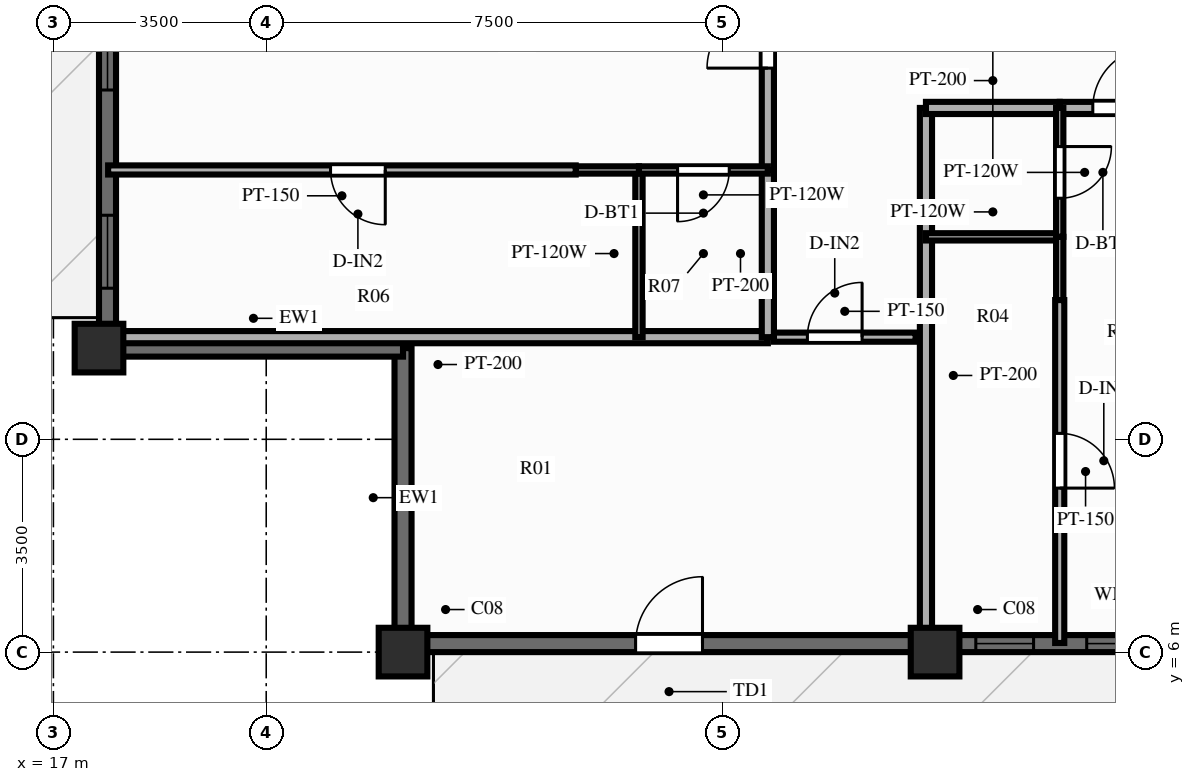
"""IFC4 building model, lengths in metres.
Left out: names, types, materials, properties, quantities, classifications, styles, units other than length and angle.
Written with IfcOpenShell. Run it as: python <this file> out.ifc"""

import sys

from ifc_helpers import new_model, si_unit, direction, frame, frame_2d, origin, origin_2d, place, context, subcontext, project, spatial, rectangle, extrude, source, transform, mapped, element, fill, save


model = new_model("IFC4")
c1 = context("Model", 3, precision=1e-05, world=origin(), true_north=direction((0.0, 1.0)))
c2 = subcontext(c1, "Body", "Model", "MODEL_VIEW")
j1 = project(units=[si_unit("LENGTHUNIT", "METRE"), si_unit("PLANEANGLEUNIT", "RADIAN")], contexts=[c1])
p1 = place(None, origin())
s1 = spatial("IfcSite", under=j1, at=p1, CompositionType="ELEMENT")
p2 = place(p1, origin())
s2 = spatial("IfcBuilding", under=s1, at=p2, CompositionType="ELEMENT")
p3 = place(p2, frame((0.0, 0.0, 179.8)))
s3 = spatial("IfcBuildingStorey", under=s2, at=p3, CompositionType="ELEMENT", Elevation=179.8)
m1 = source(origin(), c2, "Body", "SweptSolid", [
    extrude(rectangle(XDim=0.8, YDim=0.8, at=origin_2d()), origin(), (0.0, 0.0, 1.0), 3.0),
])
for number, where, z_axis, x_axis in (
    (1, (22.75, 6.0, 0.0), (0.0, 0.0, 1.0), (1.0, 0.0, 0.0)),
    (2, (31.5, 6.0, 0.0), (0.0, 0.0, 1.0), (1.0, 0.0, 0.0)),
    (3, (17.75, 11.0, 0.0), (0.0, 0.0, 1.0), (1.0, 0.0, 0.0)),
):
    element("IfcColumn", number, at=place(p3, frame(where, z_axis=z_axis, x_axis=x_axis)), inside=s3, PredefinedType="COLUMN", context=c2, shape_type="MappedRepresentation", body=[
        mapped(m1, transform((0.0, 0.0, 0.0), scale=1.0)),
    ])
p4 = place(p3, frame((22.75, 6.14, 0.0), z_axis=(0.0, 0.0, 1.0), x_axis=(1.0, 0.0, 0.0)))
e4 = element("IfcWall", 4, at=p4, inside=s3, PredefinedType="SOLIDWALL", context=c2, shape_type="SweptSolid", body=[
    extrude(rectangle(XDim=30.5, YDim=0.28, at=frame_2d((15.25, 0.0))), origin(), (0.0, 0.0, 1.0), 2.28),
])
p5 = place(p4, frame((4.925, 0.0, 0.0), z_axis=(0.0, 0.0, 1.0), x_axis=(-1.0, 0.0, 0.0)))
e5 = element("IfcOpeningElement", 5, at=p5, cuts=e4, PredefinedType="OPENING", context=c2, shape_type="SweptSolid", body=[
    extrude(rectangle(XDim=1.1, YDim=2.15, at=frame_2d((0.55, 1.075))), frame((0.0, 0.152, 0.0), z_axis=(0.0, -1.0, 0.0), x_axis=(1.0, 0.0, 0.0)), (0.0, 0.0, 1.0), 0.304),
])
p6 = place(p4, frame((9.42, 0.0, 0.25)))
e6 = element("IfcOpeningElement", 6, at=p6, cuts=e4, PredefinedType="OPENING", context=c2, shape_type="SweptSolid", body=[
    extrude(rectangle(XDim=0.95, YDim=1.5, at=frame_2d((0.475, 0.75))), frame((0.0, 0.152, 0.0), z_axis=(0.0, -1.0, 0.0), x_axis=(1.0, 0.0, 0.0)), (0.0, 0.0, 1.0), 0.304),
])
p7 = place(p4, frame((11.244, 0.0, 0.25)))
e7 = element("IfcOpeningElement", 7, at=p7, cuts=e4, PredefinedType="OPENING", context=c2, shape_type="SweptSolid", body=[
    extrude(rectangle(XDim=1.2, YDim=1.5, at=frame_2d((0.6, 0.75))), frame((0.0, 0.152, 0.0), z_axis=(0.0, -1.0, 0.0), x_axis=(1.0, 0.0, 0.0)), (0.0, 0.0, 1.0), 0.304),
])
p8 = place(p4, frame((13.602, 0.0, 0.25)))
e8 = element("IfcOpeningElement", 8, at=p8, cuts=e4, PredefinedType="OPENING", context=c2, shape_type="SweptSolid", body=[
    extrude(rectangle(XDim=1.2, YDim=1.5, at=frame_2d((0.6, 0.75))), frame((0.0, 0.152, 0.0), z_axis=(0.0, -1.0, 0.0), x_axis=(1.0, 0.0, 0.0)), (0.0, 0.0, 1.0), 0.304),
])
p9 = place(p4, frame((16.683, 0.0, 0.25)))
e9 = element("IfcOpeningElement", 9, at=p9, cuts=e4, PredefinedType="OPENING", context=c2, shape_type="SweptSolid", body=[
    extrude(rectangle(XDim=1.2, YDim=1.5, at=frame_2d((0.6, 0.75))), frame((0.0, 0.152, 0.0), z_axis=(0.0, -1.0, 0.0), x_axis=(1.0, 0.0, 0.0)), (0.0, 0.0, 1.0), 0.304),
])
p10 = place(p4, frame((19.68, 0.0, 0.25)))
e10 = element("IfcOpeningElement", 10, at=p10, cuts=e4, PredefinedType="OPENING", context=c2, shape_type="SweptSolid", body=[
    extrude(rectangle(XDim=1.2, YDim=1.5, at=frame_2d((0.6, 0.75))), frame((0.0, 0.152, 0.0), z_axis=(0.0, -1.0, 0.0), x_axis=(1.0, 0.0, 0.0)), (0.0, 0.0, 1.0), 0.304),
])
p11 = place(p4, frame((25.525, 0.0, 0.25)))
e11 = element("IfcOpeningElement", 11, at=p11, cuts=e4, PredefinedType="OPENING", context=c2, shape_type="SweptSolid", body=[
    extrude(rectangle(XDim=1.2, YDim=1.5, at=frame_2d((0.6, 0.75))), frame((0.0, 0.152, 0.0), z_axis=(0.0, -1.0, 0.0), x_axis=(1.0, 0.0, 0.0)), (0.0, 0.0, 1.0), 0.304),
])
p12 = place(p3, frame((17.89, 11.0, 0.0), z_axis=(0.0, 0.0, 1.0), x_axis=(0.0, 1.0, 0.0)))
e12 = element("IfcWall", 12, at=p12, inside=s3, PredefinedType="SOLIDWALL", context=c2, shape_type="SweptSolid", body=[
    extrude(rectangle(XDim=32.0, YDim=0.28, at=frame_2d((16.0, 0.0))), origin(), (0.0, 0.0, 1.0), 2.28),
])
p13 = place(p12, frame((0.985, 0.0, 0.25)))
e13 = element("IfcOpeningElement", 13, at=p13, cuts=e12, PredefinedType="OPENING", context=c2, shape_type="SweptSolid", body=[
    extrude(rectangle(XDim=1.2, YDim=1.5, at=frame_2d((0.6, 0.75))), frame((0.0, 0.152, 0.0), z_axis=(0.0, -1.0, 0.0), x_axis=(1.0, 0.0, 0.0)), (0.0, 0.0, 1.0), 0.304),
])
p14 = place(p12, frame((4.245, 0.0, 0.25)))
e14 = element("IfcOpeningElement", 14, at=p14, cuts=e12, PredefinedType="OPENING", context=c2, shape_type="SweptSolid", body=[
    extrude(rectangle(XDim=1.2, YDim=1.5, at=frame_2d((0.6, 0.75))), frame((0.0, 0.152, 0.0), z_axis=(0.0, -1.0, 0.0), x_axis=(1.0, 0.0, 0.0)), (0.0, 0.0, 1.0), 0.304),
])
p15 = place(p12, frame((8.667, 0.0, 0.25)))
e15 = element("IfcOpeningElement", 15, at=p15, cuts=e12, PredefinedType="OPENING", context=c2, shape_type="SweptSolid", body=[
    extrude(rectangle(XDim=1.2, YDim=1.5, at=frame_2d((0.6, 0.75))), frame((0.0, 0.152, 0.0), z_axis=(0.0, -1.0, 0.0), x_axis=(1.0, 0.0, 0.0)), (0.0, 0.0, 1.0), 0.304),
])
p16 = place(p12, frame((12.029, 0.0, 0.25)))
e16 = element("IfcOpeningElement", 16, at=p16, cuts=e12, PredefinedType="OPENING", context=c2, shape_type="SweptSolid", body=[
    extrude(rectangle(XDim=1.2, YDim=1.5, at=frame_2d((0.6, 0.75))), frame((0.0, 0.152, 0.0), z_axis=(0.0, -1.0, 0.0), x_axis=(1.0, 0.0, 0.0)), (0.0, 0.0, 1.0), 0.304),
])
p17 = place(p12, frame((15.066, 0.0, 0.0)))
e17 = element("IfcOpeningElement", 17, at=p17, cuts=e12, PredefinedType="OPENING", context=c2, shape_type="SweptSolid", body=[
    extrude(rectangle(XDim=1.6, YDim=2.15, at=frame_2d((0.8, 1.075))), frame((0.0, 0.152, 0.0), z_axis=(0.0, -1.0, 0.0), x_axis=(1.0, 0.0, 0.0)), (0.0, 0.0, 1.0), 0.304),
])
p18 = place(p12, frame((19.111, 0.0, 0.25)))
e18 = element("IfcOpeningElement", 18, at=p18, cuts=e12, PredefinedType="OPENING", context=c2, shape_type="SweptSolid", body=[
    extrude(rectangle(XDim=1.2, YDim=1.5, at=frame_2d((0.6, 0.75))), frame((0.0, 0.152, 0.0), z_axis=(0.0, -1.0, 0.0), x_axis=(1.0, 0.0, 0.0)), (0.0, 0.0, 1.0), 0.304),
])
p19 = place(p12, frame((22.47, 0.0, 0.25)))
e19 = element("IfcOpeningElement", 19, at=p19, cuts=e12, PredefinedType="OPENING", context=c2, shape_type="SweptSolid", body=[
    extrude(rectangle(XDim=1.2, YDim=1.5, at=frame_2d((0.6, 0.75))), frame((0.0, 0.152, 0.0), z_axis=(0.0, -1.0, 0.0), x_axis=(1.0, 0.0, 0.0)), (0.0, 0.0, 1.0), 0.304),
])
p20 = place(p12, frame((26.006, 0.0, 0.25)))
e20 = element("IfcOpeningElement", 20, at=p20, cuts=e12, PredefinedType="OPENING", context=c2, shape_type="SweptSolid", body=[
    extrude(rectangle(XDim=1.2, YDim=1.5, at=frame_2d((0.6, 0.75))), frame((0.0, 0.152, 0.0), z_axis=(0.0, -1.0, 0.0), x_axis=(1.0, 0.0, 0.0)), (0.0, 0.0, 1.0), 0.304),
])
p21 = place(p12, frame((29.266, 0.0, 0.25)))
e21 = element("IfcOpeningElement", 21, at=p21, cuts=e12, PredefinedType="OPENING", context=c2, shape_type="SweptSolid", body=[
    extrude(rectangle(XDim=1.2, YDim=1.5, at=frame_2d((0.6, 0.75))), frame((0.0, 0.152, 0.0), z_axis=(0.0, -1.0, 0.0), x_axis=(1.0, 0.0, 0.0)), (0.0, 0.0, 1.0), 0.304),
])
for number, where, z_axis, x_axis in (
    (22, (22.75, 6.08, 0.0), (0.0, 0.0, 1.0), (0.0, 1.0, 0.0)),
    (23, (17.83, 11.0, 0.0), (0.0, 0.0, 1.0), (1.0, 0.0, 0.0)),
):
    element("IfcWall", number, at=place(p3, frame(where, z_axis=z_axis, x_axis=x_axis)), inside=s3, PredefinedType="SOLIDWALL", context=c2, shape_type="SweptSolid", body=[
        extrude(rectangle(XDim=4.92, YDim=0.28, at=frame_2d((2.46, 0.0))), origin(), (0.0, 0.0, 1.0), 2.28),
    ])
p22 = place(p3, frame((28.85, 11.18, 0.0), z_axis=(0.0, 0.0, 1.0), x_axis=(1.0, 0.0, 0.0)))
e24 = element("IfcWall", 24, at=p22, inside=s3, PredefinedType="PARTITIONING", context=c2, shape_type="SweptSolid", body=[
    extrude(rectangle(XDim=2.33, YDim=0.15, at=frame_2d((1.165, 0.0))), origin(), (0.0, 0.0, 1.0), 2.79),
])
p23 = place(p22, frame((0.55, 0.0, 0.0)))
e25 = element("IfcOpeningElement", 25, at=p23, cuts=e24, PredefinedType="OPENING", context=c2, shape_type="SweptSolid", body=[
    extrude(rectangle(XDim=0.9, YDim=2.1, at=frame_2d((0.45, 1.05))), frame((0.0, 0.087, 0.0), z_axis=(0.0, -1.0, 0.0), x_axis=(1.0, 0.0, 0.0)), (0.0, 0.0, 1.0), 0.174),
])
p24 = place(p3, frame((31.35, 14.95, 0.0), z_axis=(0.0, 0.0, 1.0), x_axis=(0.0, -1.0, 0.0)))
e26 = element("IfcWall", 26, at=p24, inside=s3, PredefinedType="PARTITIONING", context=c2, shape_type="SweptSolid", body=[
    extrude(rectangle(XDim=8.8, YDim=0.2, at=frame_2d((4.4, 0.0))), origin(), (0.0, 0.0, 1.0), 2.39),
])
p25 = place(p3, frame((31.35, 14.95, 0.0), z_axis=(0.0, 0.0, 1.0), x_axis=(1.0, 0.0, 0.0)))
e27 = element("IfcWall", 27, at=p25, inside=s3, PredefinedType="PARTITIONING", context=c2, shape_type="SweptSolid", body=[
    extrude(rectangle(XDim=2.2, YDim=0.2, at=frame_2d((1.1, 0.0))), origin(), (0.0, 0.0, 1.0), 2.79),
])
p26 = place(p3, frame((33.55, 14.95, 0.0), z_axis=(0.0, 0.0, 1.0), x_axis=(1.0, 0.0, 0.0)))
e28 = element("IfcWall", 28, at=p26, inside=s3, PredefinedType="PARTITIONING", context=c2, shape_type="SweptSolid", body=[
    extrude(rectangle(XDim=2.088, YDim=0.2, at=frame_2d((1.044, 0.0))), origin(), (0.0, 0.0, 1.0), 2.79),
])
p27 = place(p26, frame((0.544, 0.0, 0.0)))
e29 = element("IfcOpeningElement", 29, at=p27, cuts=e28, PredefinedType="OPENING", context=c2, shape_type="SweptSolid", body=[
    extrude(rectangle(XDim=1.0, YDim=2.15, at=frame_2d((0.5, 1.075))), frame((0.0, 0.112, 0.0), z_axis=(0.0, -1.0, 0.0), x_axis=(1.0, 0.0, 0.0)), (0.0, 0.0, 1.0), 0.224),
])
p28 = place(p3, frame((31.35, 12.83, 0.0), z_axis=(0.0, 0.0, 1.0), x_axis=(1.0, 0.0, 0.0)))
e30 = element("IfcWall", 30, at=p28, inside=s3, PredefinedType="PARTITIONING", context=c2, shape_type="SweptSolid", body=[
    extrude(rectangle(XDim=2.2, YDim=0.12, at=frame_2d((1.1, 0.0))), origin(), (0.0, 0.0, 1.0), 2.79),
])
p29 = place(p3, frame((33.55, 14.95, 0.0), z_axis=(0.0, 0.0, 1.0), x_axis=(0.0, -1.0, 0.0)))
e31 = element("IfcWall", 31, at=p29, inside=s3, PredefinedType="PARTITIONING", context=c2, shape_type="SweptSolid", body=[
    extrude(rectangle(XDim=2.12, YDim=0.12, at=frame_2d((1.06, 0.0))), origin(), (0.0, 0.0, 1.0), 2.79),
])
p30 = place(p29, frame((0.635, 0.0, 0.0)))
e32 = element("IfcOpeningElement", 32, at=p30, cuts=e31, PredefinedType="OPENING", context=c2, shape_type="SweptSolid", body=[
    extrude(rectangle(XDim=0.85, YDim=2.05, at=frame_2d((0.425, 1.025))), frame((0.0, 0.072, 0.0), z_axis=(0.0, -1.0, 0.0), x_axis=(1.0, 0.0, 0.0)), (0.0, 0.0, 1.0), 0.144),
])
p31 = place(p3, frame((33.55, 12.83, 0.0), z_axis=(0.0, 0.0, 1.0), x_axis=(0.0, -1.0, 0.0)))
e33 = element("IfcWall", 33, at=p31, inside=s3, PredefinedType="PARTITIONING", context=c2, shape_type="SweptSolid", body=[
    extrude(rectangle(XDim=1.04, YDim=0.12, at=frame_2d((0.52, 0.0))), origin(), (0.0, 0.0, 1.0), 2.79),
])
p32 = place(p3, frame((33.55, 11.79, 0.0), z_axis=(0.0, 0.0, 1.0), x_axis=(0.0, -1.0, 0.0)))
e34 = element("IfcWall", 34, at=p32, inside=s3, PredefinedType="PARTITIONING", context=c2, shape_type="SweptSolid", body=[
    extrude(rectangle(XDim=5.64, YDim=0.15, at=frame_2d((2.82, 0.0))), origin(), (0.0, 0.0, 1.0), 2.79),
])
p33 = place(p32, frame((2.192, 0.0, 0.0)))
e35 = element("IfcOpeningElement", 35, at=p33, cuts=e34, PredefinedType="OPENING", context=c2, shape_type="SweptSolid", body=[
    extrude(rectangle(XDim=0.9, YDim=2.1, at=frame_2d((0.45, 1.05))), frame((0.0, 0.087, 0.0), z_axis=(0.0, -1.0, 0.0), x_axis=(1.0, 0.0, 0.0)), (0.0, 0.0, 1.0), 0.174),
])
p34 = place(p3, frame((28.75, 11.18, 0.0), z_axis=(0.0, 0.0, 1.0), x_axis=(-1.0, 0.0, 0.0)))
e36 = element("IfcWall", 36, at=p34, inside=s3, PredefinedType="PARTITIONING", context=c2, shape_type="SweptSolid", body=[
    extrude(rectangle(XDim=10.85, YDim=0.2, at=frame_2d((5.425, 0.0))), origin(), (0.0, 0.0, 1.0), 2.79),
])
p35 = place(p3, frame((28.75, 11.18, 0.0), z_axis=(0.0, 0.0, 1.0), x_axis=(0.0, 1.0, 0.0)))
e37 = element("IfcWall", 37, at=p35, inside=s3, PredefinedType="PARTITIONING", context=c2, shape_type="SweptSolid", body=[
    extrude(rectangle(XDim=2.75, YDim=0.2, at=frame_2d((1.375, 0.0))), origin(), (0.0, 0.0, 1.0), 2.79),
])
p36 = place(p3, frame((28.75, 13.93, 0.0), z_axis=(0.0, 0.0, 1.0), x_axis=(0.0, 1.0, 0.0)))
e38 = element("IfcWall", 38, at=p36, inside=s3, PredefinedType="PARTITIONING", context=c2, shape_type="SweptSolid", body=[
    extrude(rectangle(XDim=4.35, YDim=0.2, at=frame_2d((2.175, 0.0))), origin(), (0.0, 0.0, 1.0), 2.79),
])
p37 = place(p36, frame((1.675, 0.0, 0.0)))
e39 = element("IfcOpeningElement", 39, at=p37, cuts=e38, PredefinedType="OPENING", context=c2, shape_type="SweptSolid", body=[
    extrude(rectangle(XDim=1.0, YDim=2.15, at=frame_2d((0.5, 1.075))), frame((0.0, 0.112, 0.0), z_axis=(0.0, -1.0, 0.0), x_axis=(1.0, 0.0, 0.0)), (0.0, 0.0, 1.0), 0.224),
])
p38 = place(p3, frame((26.63, 11.18, 0.0), z_axis=(0.0, 0.0, 1.0), x_axis=(0.0, 1.0, 0.0)))
e40 = element("IfcWall", 40, at=p38, inside=s3, PredefinedType="PARTITIONING", context=c2, shape_type="SweptSolid", body=[
    extrude(rectangle(XDim=2.75, YDim=0.12, at=frame_2d((1.375, 0.0))), origin(), (0.0, 0.0, 1.0), 2.79),
])
p39 = place(p3, frame((28.75, 13.93, 0.0), z_axis=(0.0, 0.0, 1.0), x_axis=(-1.0, 0.0, 0.0)))
e41 = element("IfcWall", 41, at=p39, inside=s3, PredefinedType="PARTITIONING", context=c2, shape_type="SweptSolid", body=[
    extrude(rectangle(XDim=2.12, YDim=0.12, at=frame_2d((1.06, 0.0))), origin(), (0.0, 0.0, 1.0), 2.79),
])
p40 = place(p39, frame((0.635, 0.0, 0.0)))
e42 = element("IfcOpeningElement", 42, at=p40, cuts=e41, PredefinedType="OPENING", context=c2, shape_type="SweptSolid", body=[
    extrude(rectangle(XDim=0.85, YDim=2.05, at=frame_2d((0.425, 1.025))), frame((0.0, 0.072, 0.0), z_axis=(0.0, -1.0, 0.0), x_axis=(1.0, 0.0, 0.0)), (0.0, 0.0, 1.0), 0.144),
])
p41 = place(p3, frame((26.63, 13.93, 0.0), z_axis=(0.0, 0.0, 1.0), x_axis=(-1.0, 0.0, 0.0)))
e43 = element("IfcWall", 43, at=p41, inside=s3, PredefinedType="PARTITIONING", context=c2, shape_type="SweptSolid", body=[
    extrude(rectangle(XDim=1.04, YDim=0.12, at=frame_2d((0.52, 0.0))), origin(), (0.0, 0.0, 1.0), 2.79),
])
p42 = place(p3, frame((25.59, 13.93, 0.0), z_axis=(0.0, 0.0, 1.0), x_axis=(-1.0, 0.0, 0.0)))
e44 = element("IfcWall", 44, at=p42, inside=s3, PredefinedType="PARTITIONING", context=c2, shape_type="SweptSolid", body=[
    extrude(rectangle(XDim=7.69, YDim=0.15, at=frame_2d((3.845, 0.0))), origin(), (0.0, 0.0, 1.0), 2.79),
])
p43 = place(p42, frame((3.132, 0.0, 0.0)))
e45 = element("IfcOpeningElement", 45, at=p43, cuts=e44, PredefinedType="OPENING", context=c2, shape_type="SweptSolid", body=[
    extrude(rectangle(XDim=0.9, YDim=2.1, at=frame_2d((0.45, 1.05))), frame((0.0, 0.087, 0.0), z_axis=(0.0, -1.0, 0.0), x_axis=(1.0, 0.0, 0.0)), (0.0, 0.0, 1.0), 0.174),
])
m2 = source(origin(), c2, "Body", "SweptSolid", [
    extrude(rectangle(XDim=1.1, YDim=2.15, at=frame_2d((0.55, 1.075))), frame((0.0, 0.025, 0.0), z_axis=(0.0, -1.0, 0.0), x_axis=(1.0, 0.0, 0.0)), (0.0, 0.0, 1.0), 0.05),
])
p44 = place(p5, origin())
e46 = element("IfcDoor", 46, at=p44, inside=s3, OperationType="SINGLE_SWING_LEFT", PredefinedType="DOOR", context=c2, shape_type="MappedRepresentation", body=[
    mapped(m2, transform((0.0, 0.0, 0.0), scale=1.0)),
])
fill(e5, e46)
m3 = source(origin(), c2, "Body", "SweptSolid", [
    extrude(rectangle(XDim=0.95, YDim=1.5, at=frame_2d((0.475, 0.75))), frame((0.0, 0.03, 0.0), z_axis=(0.0, -1.0, 0.0), x_axis=(1.0, 0.0, 0.0)), (0.0, 0.0, 1.0), 0.06),
])
p45 = place(p6, origin())
e47 = element("IfcWindow", 47, at=p45, inside=s3, PartitioningType="SINGLE_PANEL", PredefinedType="WINDOW", context=c2, shape_type="MappedRepresentation", body=[
    mapped(m3, transform((0.0, 0.0, 0.0), scale=1.0)),
])
fill(e6, e47)
m4 = source(origin(), c2, "Body", "SweptSolid", [
    extrude(rectangle(XDim=1.2, YDim=1.5, at=frame_2d((0.6, 0.75))), frame((0.0, 0.03, 0.0), z_axis=(0.0, -1.0, 0.0), x_axis=(1.0, 0.0, 0.0)), (0.0, 0.0, 1.0), 0.06),
])
p46 = place(p7, origin())
e48 = element("IfcWindow", 48, at=p46, inside=s3, PartitioningType="SINGLE_PANEL", PredefinedType="WINDOW", context=c2, shape_type="MappedRepresentation", body=[
    mapped(m4, transform((0.0, 0.0, 0.0), scale=1.0)),
])
fill(e7, e48)
p47 = place(p13, origin())
e49 = element("IfcWindow", 49, at=p47, inside=s3, PartitioningType="SINGLE_PANEL", PredefinedType="WINDOW", context=c2, shape_type="MappedRepresentation", body=[
    mapped(m4, transform((0.0, 0.0, 0.0), scale=1.0)),
])
fill(e13, e49)
p48 = place(p14, origin())
e50 = element("IfcWindow", 50, at=p48, inside=s3, PartitioningType="SINGLE_PANEL", PredefinedType="WINDOW", context=c2, shape_type="MappedRepresentation", body=[
    mapped(m4, transform((0.0, 0.0, 0.0), scale=1.0)),
])
fill(e14, e50)
m5 = source(origin(), c2, "Body", "SweptSolid", [
    extrude(rectangle(XDim=0.9, YDim=2.1, at=frame_2d((0.45, 1.05))), frame((0.0, 0.025, 0.0), z_axis=(0.0, -1.0, 0.0), x_axis=(1.0, 0.0, 0.0)), (0.0, 0.0, 1.0), 0.05),
])
p49 = place(p23, origin())
e51 = element("IfcDoor", 51, at=p49, inside=s3, OperationType="SINGLE_SWING_RIGHT", PredefinedType="DOOR", context=c2, shape_type="MappedRepresentation", body=[
    mapped(m5, transform((0.0, 0.0, 0.0), scale=1.0)),
])
fill(e25, e51)
m6 = source(origin(), c2, "Body", "SweptSolid", [
    extrude(rectangle(XDim=1.0, YDim=2.15, at=frame_2d((0.5, 1.075))), frame((0.0, 0.025, 0.0), z_axis=(0.0, -1.0, 0.0), x_axis=(1.0, 0.0, 0.0)), (0.0, 0.0, 1.0), 0.05),
])
p50 = place(p27, origin())
e52 = element("IfcDoor", 52, at=p50, inside=s3, OperationType="SINGLE_SWING_RIGHT", PredefinedType="DOOR", context=c2, shape_type="MappedRepresentation", body=[
    mapped(m6, transform((0.0, 0.0, 0.0), scale=1.0)),
])
fill(e29, e52)
m7 = source(origin(), c2, "Body", "SweptSolid", [
    extrude(rectangle(XDim=0.85, YDim=2.05, at=frame_2d((0.425, 1.025))), frame((0.0, 0.025, 0.0), z_axis=(0.0, -1.0, 0.0), x_axis=(1.0, 0.0, 0.0)), (0.0, 0.0, 1.0), 0.05),
])
p51 = place(p30, origin())
e53 = element("IfcDoor", 53, at=p51, inside=s3, OperationType="SINGLE_SWING_LEFT", PredefinedType="DOOR", context=c2, shape_type="MappedRepresentation", body=[
    mapped(m7, transform((0.0, 0.0, 0.0), scale=1.0)),
])
fill(e32, e53)
p52 = place(p33, origin())
e54 = element("IfcDoor", 54, at=p52, inside=s3, OperationType="SINGLE_SWING_RIGHT", PredefinedType="DOOR", context=c2, shape_type="MappedRepresentation", body=[
    mapped(m5, transform((0.0, 0.0, 0.0), scale=1.0)),
])
fill(e35, e54)
p53 = place(p37, origin())
e55 = element("IfcDoor", 55, at=p53, inside=s3, OperationType="SINGLE_SWING_LEFT", PredefinedType="DOOR", context=c2, shape_type="MappedRepresentation", body=[
    mapped(m6, transform((0.0, 0.0, 0.0), scale=1.0)),
])
fill(e39, e55)
p54 = place(p40, origin())
e56 = element("IfcDoor", 56, at=p54, inside=s3, OperationType="SINGLE_SWING_RIGHT", PredefinedType="DOOR", context=c2, shape_type="MappedRepresentation", body=[
    mapped(m7, transform((0.0, 0.0, 0.0), scale=1.0)),
])
fill(e42, e56)
p55 = place(p43, origin())
e57 = element("IfcDoor", 57, at=p55, inside=s3, OperationType="SINGLE_SWING_LEFT", PredefinedType="DOOR", context=c2, shape_type="MappedRepresentation", body=[
    mapped(m5, transform((0.0, 0.0, 0.0), scale=1.0)),
])
fill(e45, e57)
save(model, sys.argv[1])
